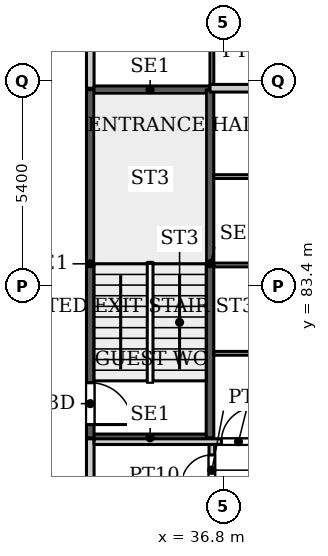
"""IFC4 building model, lengths in metres.
Left out: names, types, materials, properties, quantities, classifications, styles, units other than length and angle.
Written with IfcOpenShell. Run it as: python <this file> out.ifc"""

import sys

from ifc_helpers import new_model, si_unit, direction, frame, frame_2d, origin, place, context, subcontext, project, spatial, rectangle, extrude, source, transform, mapped, element, fill, save


model = new_model("IFC4")
c1 = context("Model", 3, precision=1e-05, world=origin(), true_north=direction((0.0, 1.0)))
c2 = subcontext(c1, "Body", "Model", "MODEL_VIEW")
j1 = project(units=[si_unit("LENGTHUNIT", "METRE"), si_unit("PLANEANGLEUNIT", "RADIAN")], contexts=[c1])
p1 = place(None, origin())
s1 = spatial("IfcSite", under=j1, at=p1, CompositionType="ELEMENT")
p2 = place(p1, origin())
s2 = spatial("IfcBuilding", under=s1, at=p2, CompositionType="ELEMENT")
p3 = place(p2, frame((0.0, 0.0, 57.8)))
s3 = spatial("IfcBuildingStorey", under=s2, at=p3, CompositionType="ELEMENT", Elevation=57.8)
for number, where, z_axis, x_axis in (
    (1, (33.3, 79.4, 0.0), (0.0, 0.0, 1.0), (1.0, 0.0, 0.0)),
    (2, (33.3, 88.56, 0.0), (0.0, 0.0, 1.0), (1.0, 0.0, 0.0)),
):
    element("IfcWall", number, at=place(p3, frame(where, z_axis=z_axis, x_axis=x_axis)), inside=s3, PredefinedType="SHEAR", context=c2, shape_type="SweptSolid", body=[
        extrude(rectangle(XDim=3.15, YDim=0.2, at=frame_2d((1.575, 0.0))), origin(), (0.0, 0.0, 1.0), 3.9),
    ])
p4 = place(p3, frame((33.3, 79.4, 0.0), z_axis=(0.0, 0.0, 1.0), x_axis=(0.0, 1.0, 0.0)))
e3 = element("IfcWall", 3, at=p4, inside=s3, PredefinedType="SHEAR", context=c2, shape_type="SweptSolid", body=[
    extrude(rectangle(XDim=9.16, YDim=0.2, at=frame_2d((4.58, 0.0))), origin(), (0.0, 0.0, 1.0), 3.9),
])
p5 = place(p4, frame((0.35, 0.0, 0.0)))
e4 = element("IfcOpeningElement", 4, at=p5, cuts=e3, PredefinedType="OPENING", context=c2, shape_type="SweptSolid", body=[
    extrude(rectangle(XDim=1.1, YDim=2.2, at=frame_2d((0.55, 1.1))), frame((0.0, 0.11, 0.0), z_axis=(0.0, -1.0, 0.0), x_axis=(1.0, 0.0, 0.0)), (0.0, 0.0, 1.0), 0.22),
])
p6 = place(p3, frame((36.45, 79.4, 0.0), z_axis=(0.0, 0.0, 1.0), x_axis=(0.0, 1.0, 0.0)))
e5 = element("IfcWall", 5, at=p6, inside=s3, PredefinedType="SHEAR", context=c2, shape_type="SweptSolid", body=[
    extrude(rectangle(XDim=9.16, YDim=0.2, at=frame_2d((4.58, 0.0))), origin(), (0.0, 0.0, 1.0), 3.9),
])
p7 = place(p3, frame((33.3, 54.4, 0.0), z_axis=(0.0, 0.0, 1.0), x_axis=(0.0, 1.0, 0.0)))
e6 = element("IfcWall", 6, at=p7, inside=s3, PredefinedType="PARTITIONING", context=c2, shape_type="SweptSolid", body=[
    extrude(rectangle(XDim=24.975, YDim=0.2, at=frame_2d((12.488, 0.0))), origin(), (0.0, 0.0, 1.0), 3.6),
])
p8 = place(p7, frame((10.6, 0.0, 0.0)))
e7 = element("IfcOpeningElement", 7, at=p8, cuts=e6, PredefinedType="OPENING", context=c2, shape_type="SweptSolid", body=[
    extrude(rectangle(XDim=1.0, YDim=2.1, at=frame_2d((0.5, 1.05))), frame((0.0, 0.11, 0.0), z_axis=(0.0, -1.0, 0.0), x_axis=(1.0, 0.0, 0.0)), (0.0, 0.0, 1.0), 0.22),
])
p9 = place(p7, frame((22.0, 0.0, 0.0)))
e8 = element("IfcOpeningElement", 8, at=p9, cuts=e6, PredefinedType="OPENING", context=c2, shape_type="SweptSolid", body=[
    extrude(rectangle(XDim=1.0, YDim=2.1, at=frame_2d((0.5, 1.05))), frame((0.0, 0.11, 0.0), z_axis=(0.0, -1.0, 0.0), x_axis=(1.0, 0.0, 0.0)), (0.0, 0.0, 1.0), 0.22),
])
p10 = place(p3, frame((33.3, 88.6, 0.0), z_axis=(0.0, 0.0, 1.0), x_axis=(0.0, 1.0, 0.0)))
e9 = element("IfcWall", 9, at=p10, inside=s3, PredefinedType="PARTITIONING", context=c2, shape_type="SweptSolid", body=[
    extrude(rectangle(XDim=5.175, YDim=0.2, at=frame_2d((2.587, 0.0))), origin(), (0.0, 0.0, 1.0), 3.6),
])
p11 = place(p10, frame((3.7, 0.0, 0.0)))
e10 = element("IfcOpeningElement", 10, at=p11, cuts=e9, PredefinedType="OPENING", context=c2, shape_type="SweptSolid", body=[
    extrude(rectangle(XDim=1.0, YDim=2.1, at=frame_2d((0.5, 1.05))), frame((0.0, 0.11, 0.0), z_axis=(0.0, -1.0, 0.0), x_axis=(1.0, 0.0, 0.0)), (0.0, 0.0, 1.0), 0.22),
])
p12 = place(p3, frame((33.4, 79.3, 0.0), z_axis=(0.0, 0.0, 1.0), x_axis=(1.0, 0.0, 0.0)))
e11 = element("IfcWall", 11, at=p12, inside=s3, PredefinedType="PARTITIONING", context=c2, shape_type="SweptSolid", body=[
    extrude(rectangle(XDim=12.5, YDim=0.15, at=frame_2d((6.25, 0.0))), origin(), (0.0, 0.0, 1.0), 3.6),
])
p13 = place(p12, frame((3.35, 0.0, 0.0)))
e12 = element("IfcOpeningElement", 12, at=p13, cuts=e11, PredefinedType="OPENING", context=c2, shape_type="SweptSolid", body=[
    extrude(rectangle(XDim=0.9, YDim=2.1, at=frame_2d((0.45, 1.05))), frame((0.0, 0.085, 0.0), z_axis=(0.0, -1.0, 0.0), x_axis=(1.0, 0.0, 0.0)), (0.0, 0.0, 1.0), 0.17),
])
p14 = place(p3, frame((36.45, 88.6, 0.0), z_axis=(0.0, 0.0, 1.0), x_axis=(1.0, 0.0, 0.0)))
e13 = element("IfcWall", 13, at=p14, inside=s3, PredefinedType="PARTITIONING", context=c2, shape_type="SweptSolid", body=[
    extrude(rectangle(XDim=9.45, YDim=0.2, at=frame_2d((4.725, 0.0))), origin(), (0.0, 0.0, 1.0), 3.147),
])
p15 = place(p3, frame((36.5, 77.875, 0.0), z_axis=(0.0, 0.0, 1.0), x_axis=(0.0, 1.0, 0.0)))
e14 = element("IfcWall", 14, at=p15, inside=s3, PredefinedType="PARTITIONING", context=c2, shape_type="SweptSolid", body=[
    extrude(rectangle(XDim=1.35, YDim=0.15, at=frame_2d((0.675, 0.0))), origin(), (0.0, 0.0, 1.0), 3.6),
])
p16 = place(p15, frame((0.275, 0.0, 0.0)))
e15 = element("IfcOpeningElement", 15, at=p16, cuts=e14, PredefinedType="OPENING", context=c2, shape_type="SweptSolid", body=[
    extrude(rectangle(XDim=0.8, YDim=2.1, at=frame_2d((0.4, 1.05))), frame((0.0, 0.085, 0.0), z_axis=(0.0, -1.0, 0.0), x_axis=(1.0, 0.0, 0.0)), (0.0, 0.0, 1.0), 0.17),
])
p17 = place(p3, frame((36.5, 88.7, 0.0), z_axis=(0.0, 0.0, 1.0), x_axis=(0.0, 1.0, 0.0)))
e16 = element("IfcWall", 16, at=p17, inside=s3, PredefinedType="PARTITIONING", context=c2, shape_type="SweptSolid", body=[
    extrude(rectangle(XDim=3.25, YDim=0.1, at=frame_2d((1.625, 0.0))), origin(), (0.0, 0.0, 1.0), 3.6),
])
p18 = place(p17, frame((1.1, 0.0, 0.0)))
e17 = element("IfcOpeningElement", 17, at=p18, cuts=e16, PredefinedType="OPENING", context=c2, shape_type="SweptSolid", body=[
    extrude(rectangle(XDim=0.9, YDim=2.1, at=frame_2d((0.45, 1.05))), frame((0.0, 0.06, 0.0), z_axis=(0.0, -1.0, 0.0), x_axis=(1.0, 0.0, 0.0)), (0.0, 0.0, 1.0), 0.12),
])
p19 = place(p3, frame((36.549, 81.625, 0.0), z_axis=(0.0, 0.0, 1.0), x_axis=(1.0, 0.0, 0.0)))
e18 = element("IfcWall", 18, at=p19, inside=s3, PredefinedType="PARTITIONING", context=c2, shape_type="SweptSolid", body=[
    extrude(rectangle(XDim=9.351, YDim=0.1, at=frame_2d((4.675, 0.0))), origin(), (0.0, 0.0, 1.0), 3.6),
])
p20 = place(p19, frame((4.176, 0.0, 0.0)))
e19 = element("IfcOpeningElement", 19, at=p20, cuts=e18, PredefinedType="OPENING", context=c2, shape_type="SweptSolid", body=[
    extrude(rectangle(XDim=0.9, YDim=2.1, at=frame_2d((0.45, 1.05))), frame((0.0, 0.06, 0.0), z_axis=(0.0, -1.0, 0.0), x_axis=(1.0, 0.0, 0.0)), (0.0, 0.0, 1.0), 0.12),
])
p21 = place(p3, frame((36.549, 83.95, 0.0), z_axis=(0.0, 0.0, 1.0), x_axis=(1.0, 0.0, 0.0)))
e20 = element("IfcWall", 20, at=p21, inside=s3, PredefinedType="PARTITIONING", context=c2, shape_type="SweptSolid", body=[
    extrude(rectangle(XDim=9.351, YDim=0.1, at=frame_2d((4.675, 0.0))), origin(), (0.0, 0.0, 1.0), 3.6),
])
p22 = place(p21, frame((4.176, 0.0, 0.0)))
e21 = element("IfcOpeningElement", 21, at=p22, cuts=e20, PredefinedType="OPENING", context=c2, shape_type="SweptSolid", body=[
    extrude(rectangle(XDim=0.9, YDim=2.1, at=frame_2d((0.45, 1.05))), frame((0.0, 0.06, 0.0), z_axis=(0.0, -1.0, 0.0), x_axis=(1.0, 0.0, 0.0)), (0.0, 0.0, 1.0), 0.12),
])
p23 = place(p3, frame((36.549, 86.275, 0.0), z_axis=(0.0, 0.0, 1.0), x_axis=(1.0, 0.0, 0.0)))
e22 = element("IfcWall", 22, at=p23, inside=s3, PredefinedType="PARTITIONING", context=c2, shape_type="SweptSolid", body=[
    extrude(rectangle(XDim=9.351, YDim=0.1, at=frame_2d((4.675, 0.0))), origin(), (0.0, 0.0, 1.0), 3.6),
])
p24 = place(p23, frame((4.176, 0.0, 0.0)))
e23 = element("IfcOpeningElement", 23, at=p24, cuts=e22, PredefinedType="OPENING", context=c2, shape_type="SweptSolid", body=[
    extrude(rectangle(XDim=0.9, YDim=2.1, at=frame_2d((0.45, 1.05))), frame((0.0, 0.06, 0.0), z_axis=(0.0, -1.0, 0.0), x_axis=(1.0, 0.0, 0.0)), (0.0, 0.0, 1.0), 0.12),
])
m1 = source(origin(), c2, "Body", "SweptSolid", [
    extrude(rectangle(XDim=1.1, YDim=2.2, at=frame_2d((0.55, 1.1))), frame((0.0, 0.025, 0.0), z_axis=(0.0, -1.0, 0.0), x_axis=(1.0, 0.0, 0.0)), (0.0, 0.0, 1.0), 0.05),
])
p25 = place(p5, origin())
e24 = element("IfcDoor", 24, at=p25, inside=s3, OperationType="SINGLE_SWING_RIGHT", PredefinedType="DOOR", context=c2, shape_type="MappedRepresentation", body=[
    mapped(m1, transform((0.0, 0.0, 0.0), x_axis=(1.0, 0.0, 0.0), y_axis=(0.0, 1.0, 0.0), z_axis=(0.0, 0.0, 1.0), scale=1.0)),
])
fill(e4, e24)
m2 = source(origin(), c2, "Body", "SweptSolid", [
    extrude(rectangle(XDim=0.8, YDim=2.1, at=frame_2d((0.4, 1.05))), frame((0.0, 0.025, 0.0), z_axis=(0.0, -1.0, 0.0), x_axis=(1.0, 0.0, 0.0)), (0.0, 0.0, 1.0), 0.05),
])
p26 = place(p16, origin())
e25 = element("IfcDoor", 25, at=p26, inside=s3, OperationType="SINGLE_SWING_LEFT", PredefinedType="DOOR", context=c2, shape_type="MappedRepresentation", body=[
    mapped(m2, transform((0.0, 0.0, 0.0), x_axis=(1.0, 0.0, 0.0), y_axis=(0.0, 1.0, 0.0), z_axis=(0.0, 0.0, 1.0), scale=1.0)),
])
fill(e15, e25)
m3 = source(origin(), c2, "Body", "SweptSolid", [
    extrude(rectangle(XDim=0.9, YDim=2.1, at=frame_2d((0.45, 1.05))), frame((0.0, 0.025, 0.0), z_axis=(0.0, -1.0, 0.0), x_axis=(1.0, 0.0, 0.0)), (0.0, 0.0, 1.0), 0.05),
])
p27 = place(p13, origin())
e26 = element("IfcDoor", 26, at=p27, inside=s3, OperationType="SINGLE_SWING_LEFT", PredefinedType="DOOR", context=c2, shape_type="MappedRepresentation", body=[
    mapped(m3, transform((0.0, 0.0, 0.0), x_axis=(1.0, 0.0, 0.0), y_axis=(0.0, 1.0, 0.0), z_axis=(0.0, 0.0, 1.0), scale=1.0)),
])
fill(e12, e26)
save(model, sys.argv[1])
